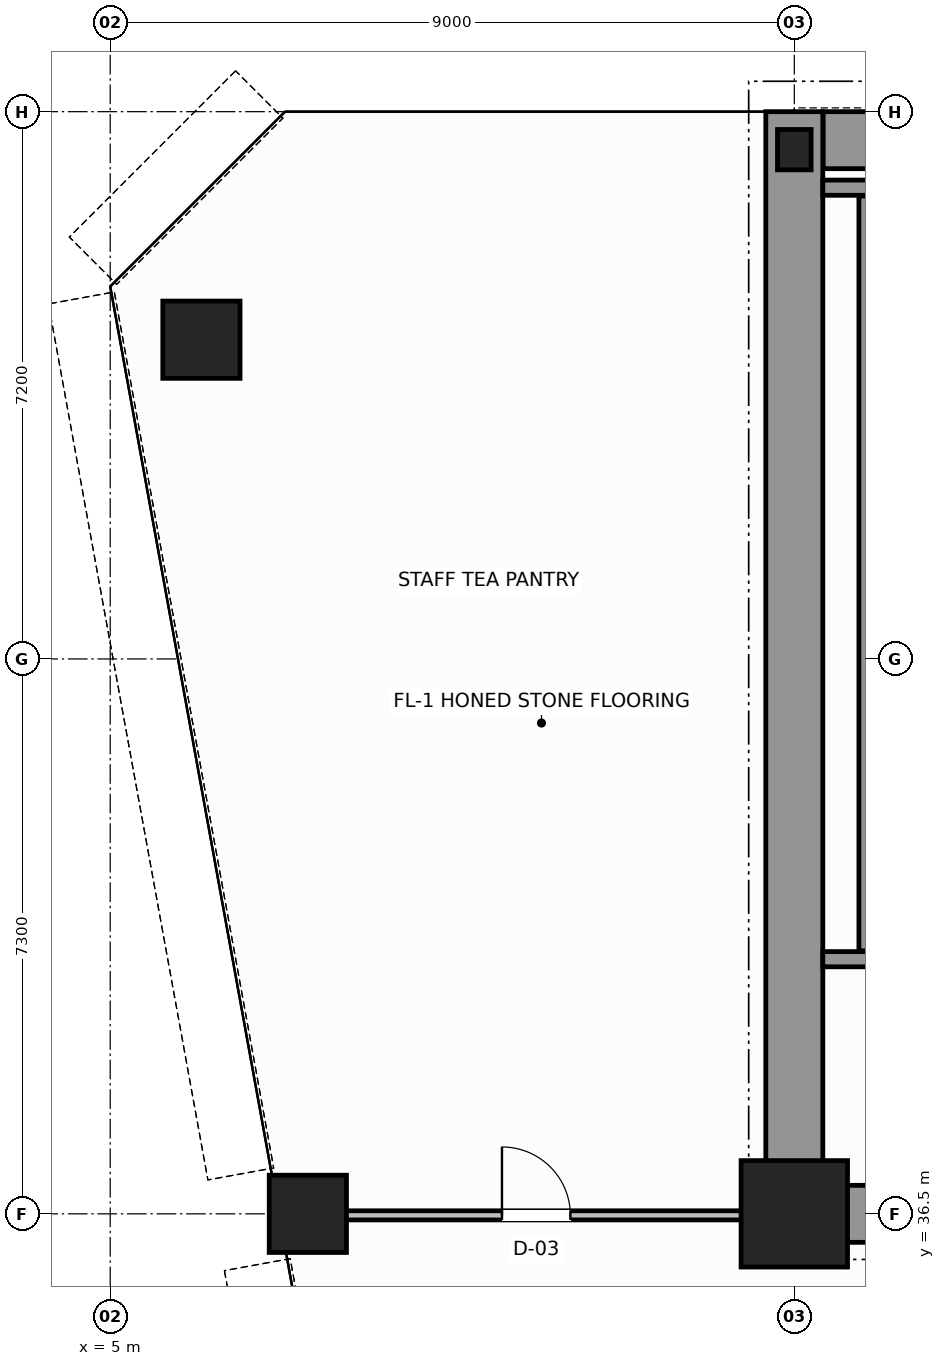
"""IFC4 building model, lengths in metres.
Left out: names, types, materials, properties, quantities, classifications, styles, units other than length and angle.
Written with IfcOpenShell. Run it as: python <this file> out.ifc"""

import sys

from ifc_helpers import new_model, si_unit, direction, frame, frame_2d, origin, origin_2d, place, context, subcontext, project, spatial, rectangle, hollow_circle, i_section, extrude, source, transform, mapped, element, fill, save


model = new_model("IFC4")
c1 = context("Model", 3, precision=1e-05, world=origin(), true_north=direction((0.0, 1.0)))
c2 = subcontext(c1, "Body", "Model", "MODEL_VIEW")
j1 = project(units=[si_unit("LENGTHUNIT", "METRE"), si_unit("PLANEANGLEUNIT", "RADIAN")], contexts=[c1])
p1 = place(None, origin())
s1 = spatial("IfcSite", under=j1, at=p1, CompositionType="ELEMENT")
p2 = place(p1, origin())
s2 = spatial("IfcBuilding", under=s1, at=p2, CompositionType="ELEMENT")
p3 = place(p2, frame((0.0, 0.0, 118.6)))
s3 = spatial("IfcBuildingStorey", under=s2, at=p3, CompositionType="ELEMENT", Elevation=118.6)
m1 = source(origin(), c2, "Body", "SweptSolid", [
    extrude(rectangle(XDim=1.4, YDim=1.4, at=origin_2d()), origin(), (0.0, 0.0, 1.0), 3.8),
])
p4 = place(p3, frame((14.0, 36.5, 0.0), z_axis=(0.0, 0.0, 1.0), x_axis=(1.0, 0.0, 0.0)))
e1 = element("IfcColumn", 1, at=p4, inside=s3, PredefinedType="COLUMN", context=c2, shape_type="MappedRepresentation", body=[
    mapped(m1, transform((0.0, 0.0, 0.0), scale=1.0)),
])
m2 = source(origin(), c2, "Body", "SweptSolid", [
    extrude(i_section(OverallWidth=0.442, OverallDepth=0.531, WebThickness=0.065, FlangeThickness=0.076, FilletRadius=0.015, at=origin_2d()), origin(), (0.0, 0.0, 1.0), 3.8),
])
p5 = place(p3, frame((14.0, 50.5, 0.0), z_axis=(0.0, 0.0, 1.0), x_axis=(1.0, 0.0, 0.0)))
e2 = element("IfcColumn", 2, at=p5, inside=s3, PredefinedType="COLUMN", context=c2, shape_type="MappedRepresentation", body=[
    mapped(m2, transform((0.0, 0.0, 0.0), scale=1.0)),
])
m3 = source(origin(), c2, "Body", "SweptSolid", [
    extrude(hollow_circle(Radius=0.508, WallThickness=0.045, at=origin_2d()), origin(), (0.0, 0.0, 1.0), 3.8),
])
for number, where, z_axis, x_axis in (
    (3, (6.2, 48.0, 0.0), (0.0, 0.0, 1.0), (1.0, 0.0, 0.0)),
    (4, (7.6, 36.5, 0.0), (0.0, 0.0, 1.0), (1.0, 0.0, 0.0)),
):
    element("IfcColumn", number, at=place(p3, frame(where, z_axis=z_axis, x_axis=x_axis)), inside=s3, PredefinedType="COLUMN", context=c2, shape_type="MappedRepresentation", body=[
        mapped(m3, transform((0.0, 0.0, 0.0), scale=1.0)),
    ])
p6 = place(p3, frame((14.379, 50.625, 0.0), z_axis=(0.0, 0.0, 1.0), x_axis=(1.0, 0.0, 0.0)))
e5 = element("IfcWall", 5, at=p6, inside=s3, PredefinedType="SHEAR", context=c2, shape_type="SweptSolid", body=[
    extrude(rectangle(XDim=19.619, YDim=0.75, at=frame_2d((9.81, 0.0))), origin(), (0.0, 0.0, 1.0), 3.8),
])
p7 = place(p3, frame((14.0, 36.5, 0.0), z_axis=(0.0, 0.0, 1.0), x_axis=(0.0, 1.0, 0.0)))
e6 = element("IfcWall", 6, at=p7, inside=s3, PredefinedType="SHEAR", context=c2, shape_type="SweptSolid", body=[
    extrude(rectangle(XDim=14.5, YDim=0.75, at=frame_2d((7.25, 0.0))), origin(), (0.0, 0.0, 1.0), 3.8),
])
p8 = place(p3, frame((14.395, 36.5, 0.0), z_axis=(0.0, 0.0, 1.0), x_axis=(1.0, 0.0, 0.0)))
e7 = element("IfcWall", 7, at=p8, inside=s3, PredefinedType="SHEAR", context=c2, shape_type="SweptSolid", body=[
    extrude(rectangle(XDim=3.805, YDim=0.75, at=frame_2d((1.902, 0.0))), origin(), (0.0, 0.0, 1.0), 2.38),
])
p9 = place(p3, frame((14.375, 39.85, 0.0), z_axis=(0.0, 0.0, 1.0), x_axis=(1.0, 0.0, 0.0)))
e8 = element("IfcWall", 8, at=p9, inside=s3, PredefinedType="SOLIDWALL", context=c2, shape_type="SweptSolid", body=[
    extrude(rectangle(XDim=4.225, YDim=0.2, at=frame_2d((2.113, 0.0))), origin(), (0.0, 0.0, 1.0), 3.8),
])
p10 = place(p9, frame((1.8, 0.0, 0.0)))
e9 = element("IfcOpeningElement", 9, at=p10, cuts=e8, PredefinedType="OPENING", context=c2, shape_type="SweptSolid", body=[
    extrude(rectangle(XDim=1.1, YDim=2.15, at=frame_2d((0.55, 1.075))), frame((0.0, 0.11, 0.0), z_axis=(0.0, -1.0, 0.0), x_axis=(1.0, 0.0, 0.0)), (0.0, 0.0, 1.0), 0.22),
])
p11 = place(p3, frame((14.375, 50.0, 0.0), z_axis=(0.0, 0.0, 1.0), x_axis=(1.0, 0.0, 0.0)))
e10 = element("IfcWall", 10, at=p11, inside=s3, PredefinedType="SOLIDWALL", context=c2, shape_type="SweptSolid", body=[
    extrude(rectangle(XDim=4.225, YDim=0.2, at=frame_2d((2.113, 0.0))), origin(), (0.0, 0.0, 1.0), 3.8),
])
p12 = place(p3, frame((14.95, 39.96, 0.0), z_axis=(0.0, 0.0, 1.0), x_axis=(0.0, 1.0, 0.0)))
e11 = element("IfcWall", 11, at=p12, inside=s3, PredefinedType="SOLIDWALL", context=c2, shape_type="SweptSolid", body=[
    extrude(rectangle(XDim=9.93, YDim=0.2, at=frame_2d((4.965, 0.0))), origin(), (0.0, 0.0, 1.0), 3.8),
])
p13 = place(p3, frame((7.269, 36.48, 0.0), z_axis=(0.0, 0.0, 1.0), x_axis=(1.0, 0.0, 0.0)))
e12 = element("IfcWall", 12, at=p13, inside=s3, PredefinedType="PARTITIONING", context=c2, shape_type="SweptSolid", body=[
    extrude(rectangle(XDim=6.671, YDim=0.12, at=frame_2d((3.335, 0.0))), origin(), (0.0, 0.0, 1.0), 2.87),
])
p14 = place(p13, frame((2.885, 0.0, 0.0)))
e13 = element("IfcOpeningElement", 13, at=p14, cuts=e12, PredefinedType="OPENING", context=c2, shape_type="SweptSolid", body=[
    extrude(rectangle(XDim=0.9, YDim=2.15, at=frame_2d((0.45, 1.075))), frame((0.0, 0.07, 0.0), z_axis=(0.0, -1.0, 0.0), x_axis=(1.0, 0.0, 0.0)), (0.0, 0.0, 1.0), 0.14),
])
m4 = source(origin(), c2, "Body", "SweptSolid", [
    extrude(rectangle(XDim=0.9, YDim=2.15, at=frame_2d((0.45, 1.075))), frame((0.0, 0.025, 0.0), z_axis=(0.0, -1.0, 0.0), x_axis=(1.0, 0.0, 0.0)), (0.0, 0.0, 1.0), 0.05),
])
p15 = place(p14, origin())
e14 = element("IfcDoor", 14, at=p15, inside=s3, OperationType="SINGLE_SWING_LEFT", PredefinedType="DOOR", context=c2, shape_type="MappedRepresentation", body=[
    mapped(m4, transform((0.0, 0.0, 0.0), scale=1.0)),
])
fill(e13, e14)
save(model, sys.argv[1])
